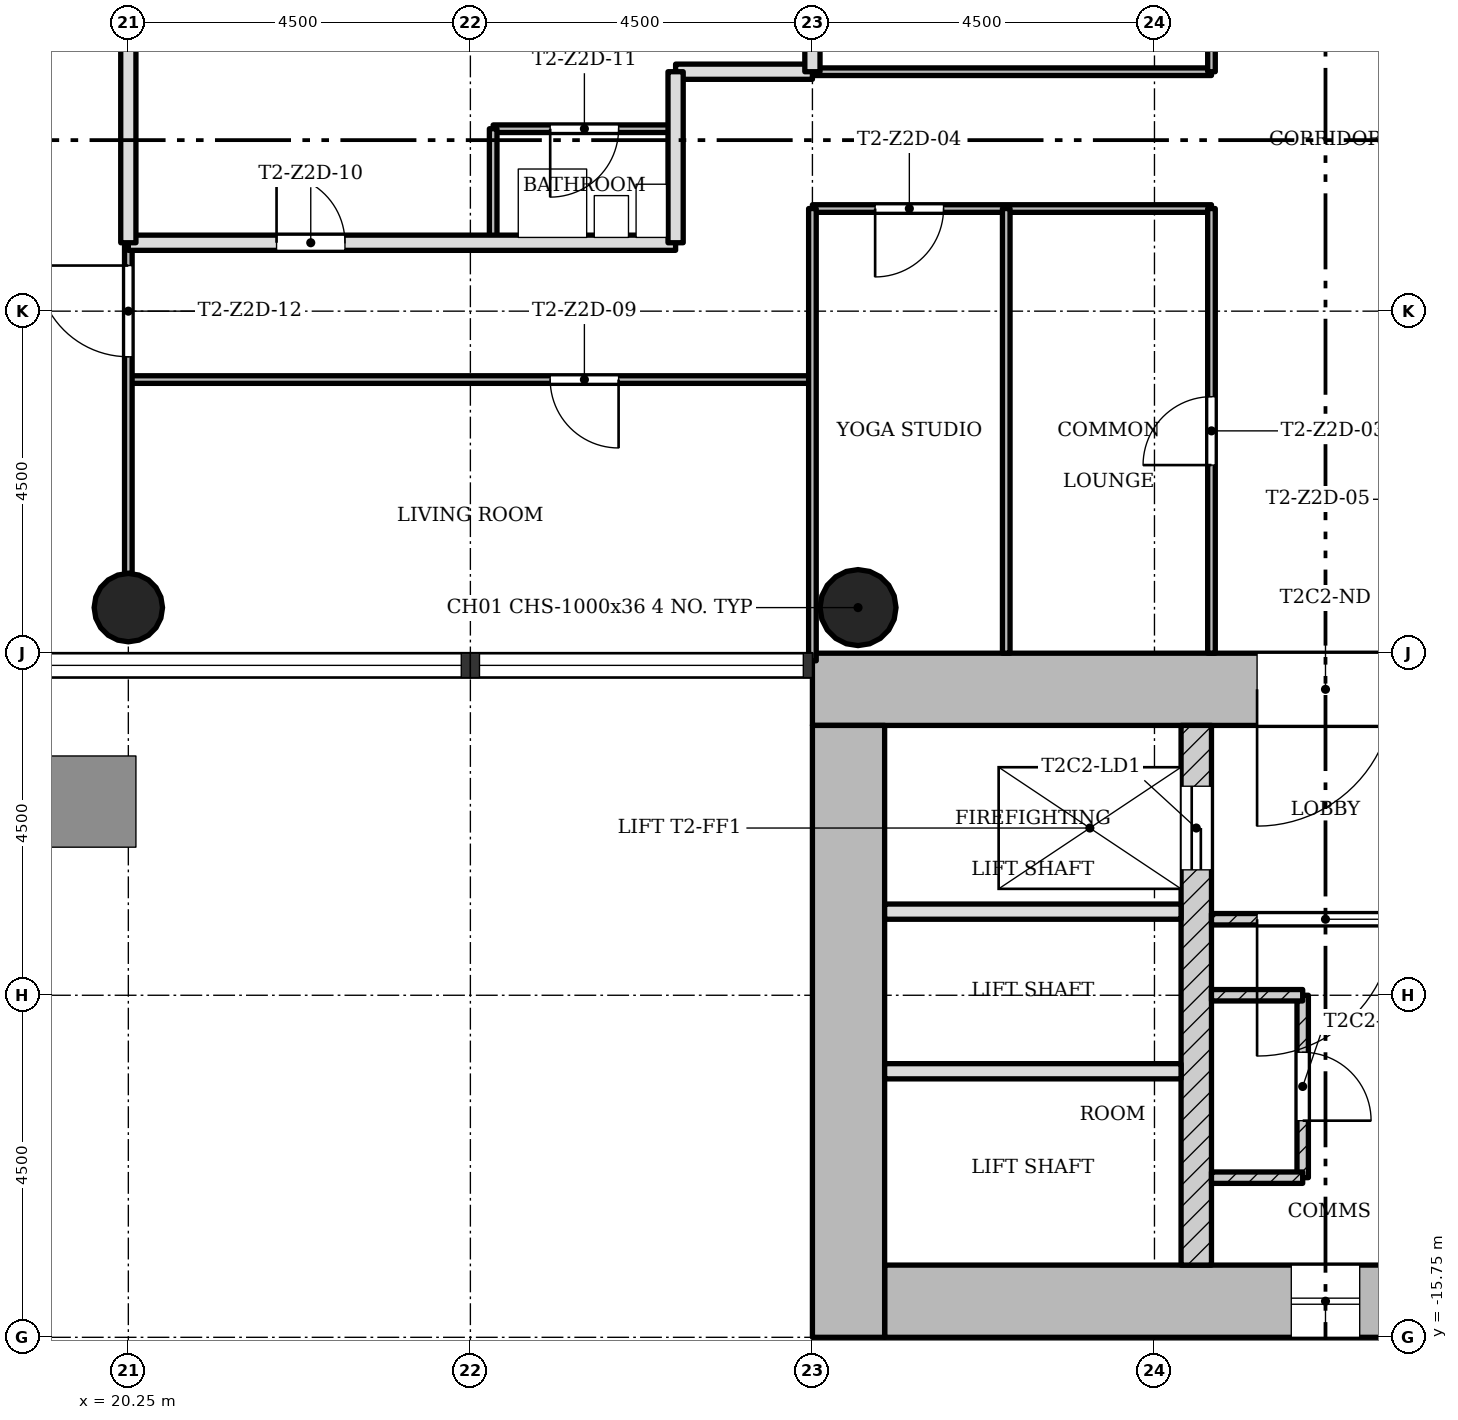
"""IFC4 building model, lengths in metres.
Left out: names, types, materials, properties, quantities, classifications, styles, units other than length and angle.
Written with IfcOpenShell. Run it as: python <this file> out.ifc"""

import sys

from ifc_helpers import new_model, si_unit, direction, frame, frame_2d, origin, origin_2d, place, context, subcontext, project, spatial, rectangle, hollow_circle, extrude, element, fill, save


model = new_model("IFC4")
c1 = context("Model", 3, precision=1e-05, world=origin(), true_north=direction((0.0, 1.0)))
c2 = subcontext(c1, "Body", "Model", "MODEL_VIEW")
j1 = project(units=[si_unit("LENGTHUNIT", "METRE"), si_unit("PLANEANGLEUNIT", "RADIAN")], contexts=[c1])
p1 = place(None, origin())
s1 = spatial("IfcSite", under=j1, at=p1, CompositionType="ELEMENT")
p2 = place(p1, origin())
s2 = spatial("IfcBuilding", under=s1, at=p2, CompositionType="ELEMENT")
p3 = place(p2, frame((0.0, 0.0, 120.8)))
s3 = spatial("IfcBuildingStorey", under=s2, at=p3, CompositionType="ELEMENT", Elevation=120.8)
p4 = place(p3, frame((30.2, -15.275, 0.0), z_axis=(0.0, 0.0, 1.0), x_axis=(1.0, 0.0, 0.0)))
e1 = element("IfcWall", 1, at=p4, inside=s3, PredefinedType="SHEAR", context=c2, shape_type="SweptSolid", body=[
    extrude(rectangle(XDim=12.55, YDim=0.95, at=frame_2d((6.275, 0.0))), origin(), (0.0, 0.0, 1.0), 3.4),
])
p5 = place(p4, frame((5.35, 0.0, 0.45)))
e2 = element("IfcOpeningElement", 2, at=p5, cuts=e1, PredefinedType="OPENING", context=c2, shape_type="SweptSolid", body=[
    extrude(rectangle(XDim=0.9, YDim=2.4, at=frame_2d((0.45, 1.2))), frame((0.0, 0.485, 0.0), z_axis=(0.0, -1.0, 0.0), x_axis=(1.0, 0.0, 0.0)), (0.0, 0.0, 1.0), 0.97),
])
p6 = place(p3, frame((41.8, -7.225, 0.0), z_axis=(0.0, 0.0, 1.0), x_axis=(-1.0, 0.0, 0.0)))
e3 = element("IfcWall", 3, at=p6, inside=s3, PredefinedType="SHEAR", context=c2, shape_type="SweptSolid", body=[
    extrude(rectangle(XDim=12.55, YDim=0.95, at=frame_2d((6.275, 0.0))), origin(), (0.0, 0.0, 1.0), 3.4),
])
p7 = place(p6, frame((4.9, 0.0, 0.0)))
e4 = element("IfcOpeningElement", 4, at=p7, cuts=e3, PredefinedType="OPENING", context=c2, shape_type="SweptSolid", body=[
    extrude(rectangle(XDim=1.8, YDim=2.1, at=frame_2d((0.9, 1.05))), frame((0.0, 0.485, 0.0), z_axis=(0.0, -1.0, 0.0), x_axis=(1.0, 0.0, 0.0)), (0.0, 0.0, 1.0), 0.97),
])
p8 = place(p3, frame((29.725, -7.7, 0.0), z_axis=(0.0, 0.0, 1.0), x_axis=(0.0, -1.0, 0.0)))
e5 = element("IfcWall", 5, at=p8, inside=s3, PredefinedType="SHEAR", context=c2, shape_type="SweptSolid", body=[
    extrude(rectangle(XDim=8.05, YDim=0.95, at=frame_2d((4.025, 0.0))), origin(), (0.0, 0.0, 1.0), 3.4),
])
p9 = place(p3, frame((34.3, -14.8, 0.0), z_axis=(0.0, 0.0, 1.0), x_axis=(0.0, 1.0, 0.0)))
e6 = element("IfcWall", 6, at=p9, inside=s3, PredefinedType="SHEAR", context=c2, shape_type="SweptSolid", body=[
    extrude(rectangle(XDim=7.1, YDim=0.4, at=frame_2d((3.55, 0.0))), origin(), (0.0, 0.0, 1.0), 3.4),
])
p10 = place(p9, frame((5.2, 0.0, 0.0)))
e7 = element("IfcOpeningElement", 7, at=p10, cuts=e6, PredefinedType="OPENING", context=c2, shape_type="SweptSolid", body=[
    extrude(rectangle(XDim=1.1, YDim=2.1, at=frame_2d((0.55, 1.05))), frame((0.0, 0.21, 0.0), z_axis=(0.0, -1.0, 0.0), x_axis=(1.0, 0.0, 0.0)), (0.0, 0.0, 1.0), 0.42),
])
p11 = place(p3, frame((20.25, -6.15, 0.0), z_axis=(0.0, 0.0, 1.0), x_axis=(1.0, 0.0, 0.0)))
e8 = element("IfcColumn", 8, at=p11, inside=s3, PredefinedType="COLUMN", context=c2, shape_type="SweptSolid", body=[
    extrude(hollow_circle(Radius=0.45, WallThickness=0.032, at=origin_2d()), origin(), (0.0, 0.0, 1.0), 3.4),
])
p12 = place(p3, frame((29.85, -6.15, 0.0), z_axis=(0.0, 0.0, 1.0), x_axis=(1.0, 0.0, 0.0)))
e9 = element("IfcColumn", 9, at=p12, inside=s3, PredefinedType="COLUMN", context=c2, shape_type="SweptSolid", body=[
    extrude(hollow_circle(Radius=0.5, WallThickness=0.036, at=origin_2d()), origin(), (0.0, 0.0, 1.0), 3.4),
])
p13 = place(p3, frame((34.5, -10.25, 0.0), z_axis=(0.0, 0.0, 1.0), x_axis=(1.0, 0.0, 0.0)))
e10 = element("IfcWall", 10, at=p13, inside=s3, PredefinedType="PARTITIONING", context=c2, shape_type="SweptSolid", body=[
    extrude(rectangle(XDim=3.0, YDim=0.15, at=frame_2d((1.5, 0.0))), origin(), (0.0, 0.0, 1.0), 3.0),
])
p14 = place(p13, frame((0.6, 0.0, 0.0)))
e11 = element("IfcOpeningElement", 11, at=p14, cuts=e10, PredefinedType="OPENING", context=c2, shape_type="SweptSolid", body=[
    extrude(rectangle(XDim=1.8, YDim=2.1, at=frame_2d((0.9, 1.05))), frame((0.0, 0.085, 0.0), z_axis=(0.0, -1.0, 0.0), x_axis=(1.0, 0.0, 0.0)), (0.0, 0.0, 1.0), 0.17),
])
for number, where, z_axis, x_axis in (
    (12, (30.2, -10.15, 0.0), (0.0, 0.0, 1.0), (1.0, 0.0, 0.0)),
    (13, (30.2, -12.25, 0.0), (0.0, 0.0, 1.0), (1.0, 0.0, 0.0)),
):
    element("IfcWall", number, at=place(p3, frame(where, z_axis=z_axis, x_axis=x_axis)), inside=s3, PredefinedType="SOLIDWALL", context=c2, shape_type="SweptSolid", body=[
        extrude(rectangle(XDim=3.9, YDim=0.2, at=frame_2d((1.95, 0.0))), origin(), (0.0, 0.0, 1.0), 3.0),
    ])
p15 = place(p3, frame((35.7, -11.25, 0.0), z_axis=(0.0, 0.0, 1.0), x_axis=(0.0, -1.0, 0.0)))
e14 = element("IfcWall", 14, at=p15, inside=s3, PredefinedType="PARTITIONING", context=c2, shape_type="SweptSolid", body=[
    extrude(rectangle(XDim=2.4, YDim=0.15, at=frame_2d((1.2, 0.0))), origin(), (0.0, 0.0, 1.0), 3.0),
])
p16 = place(p15, frame((0.75, 0.0, 0.0)))
e15 = element("IfcOpeningElement", 15, at=p16, cuts=e14, PredefinedType="OPENING", context=c2, shape_type="SweptSolid", body=[
    extrude(rectangle(XDim=0.9, YDim=2.1, at=frame_2d((0.45, 1.05))), frame((0.0, 0.085, 0.0), z_axis=(0.0, -1.0, 0.0), x_axis=(1.0, 0.0, 0.0)), (0.0, 0.0, 1.0), 0.17),
])
for number, where, z_axis, x_axis in (
    (16, (35.7, -11.25, 0.0), (0.0, 0.0, 1.0), (-1.0, 0.0, 0.0)),
    (17, (35.7, -13.65, 0.0), (0.0, 0.0, 1.0), (-1.0, 0.0, 0.0)),
):
    element("IfcWall", number, at=place(p3, frame(where, z_axis=z_axis, x_axis=x_axis)), inside=s3, PredefinedType="PARTITIONING", context=c2, shape_type="SweptSolid", body=[
        extrude(rectangle(XDim=1.2, YDim=0.15, at=frame_2d((0.6, 0.0))), origin(), (0.0, 0.0, 1.0), 3.0),
    ])
p17 = place(p3, frame((29.25, -3.15, 0.0), z_axis=(0.0, 0.0, 1.0), x_axis=(-1.0, 0.0, 0.0)))
e18 = element("IfcWall", 18, at=p17, inside=s3, PredefinedType="PARTITIONING", context=c2, shape_type="SweptSolid", body=[
    extrude(rectangle(XDim=9.0, YDim=0.1, at=frame_2d((4.5, 0.0))), origin(), (0.0, 0.0, 1.0), 3.0),
])
p18 = place(p17, frame((2.55, 0.0, 0.0)))
e19 = element("IfcOpeningElement", 19, at=p18, cuts=e18, PredefinedType="OPENING", context=c2, shape_type="SweptSolid", body=[
    extrude(rectangle(XDim=0.9, YDim=2.1, at=frame_2d((0.45, 1.05))), frame((0.0, 0.06, 0.0), z_axis=(0.0, -1.0, 0.0), x_axis=(1.0, 0.0, 0.0)), (0.0, 0.0, 1.0), 0.12),
])
p19 = place(p3, frame((27.45, -1.35, 0.0), z_axis=(0.0, 0.0, 1.0), x_axis=(-1.0, 0.0, 0.0)))
e20 = element("IfcWall", 20, at=p19, inside=s3, PredefinedType="SOLIDWALL", context=c2, shape_type="SweptSolid", body=[
    extrude(rectangle(XDim=7.2, YDim=0.2, at=frame_2d((3.6, 0.0))), origin(), (0.0, 0.0, 1.0), 3.0),
])
p20 = place(p19, frame((4.35, 0.0, 0.0)))
e21 = element("IfcOpeningElement", 21, at=p20, cuts=e20, PredefinedType="OPENING", context=c2, shape_type="SweptSolid", body=[
    extrude(rectangle(XDim=0.9, YDim=2.1, at=frame_2d((0.45, 1.05))), frame((0.0, 0.11, 0.0), z_axis=(0.0, -1.0, 0.0), x_axis=(1.0, 0.0, 0.0)), (0.0, 0.0, 1.0), 0.22),
])
p21 = place(p3, frame((34.5, -0.9, 0.0), z_axis=(0.0, 0.0, 1.0), x_axis=(-1.0, 0.0, 0.0)))
e22 = element("IfcWall", 22, at=p21, inside=s3, PredefinedType="PARTITIONING", context=c2, shape_type="SweptSolid", body=[
    extrude(rectangle(XDim=5.25, YDim=0.1, at=frame_2d((2.625, 0.0))), origin(), (0.0, 0.0, 1.0), 3.0),
])
p22 = place(p21, frame((3.525, 0.0, 0.0)))
e23 = element("IfcOpeningElement", 23, at=p22, cuts=e22, PredefinedType="OPENING", context=c2, shape_type="SweptSolid", body=[
    extrude(rectangle(XDim=0.9, YDim=2.1, at=frame_2d((0.45, 1.05))), frame((0.0, 0.06, 0.0), z_axis=(0.0, -1.0, 0.0), x_axis=(1.0, 0.0, 0.0)), (0.0, 0.0, 1.0), 0.12),
])
p23 = place(p3, frame((27.45, 0.15, 0.0), z_axis=(0.0, 0.0, 1.0), x_axis=(-1.0, 0.0, 0.0)))
e24 = element("IfcWall", 24, at=p23, inside=s3, PredefinedType="PARTITIONING", context=c2, shape_type="SweptSolid", body=[
    extrude(rectangle(XDim=2.4, YDim=0.1, at=frame_2d((1.2, 0.0))), origin(), (0.0, 0.0, 1.0), 3.0),
])
p24 = place(p23, frame((0.75, 0.0, 0.0)))
e25 = element("IfcOpeningElement", 25, at=p24, cuts=e24, PredefinedType="OPENING", context=c2, shape_type="SweptSolid", body=[
    extrude(rectangle(XDim=0.9, YDim=2.1, at=frame_2d((0.45, 1.05))), frame((0.0, 0.06, 0.0), z_axis=(0.0, -1.0, 0.0), x_axis=(1.0, 0.0, 0.0)), (0.0, 0.0, 1.0), 0.12),
])
p25 = place(p3, frame((34.5, 0.9, 0.0), z_axis=(0.0, 0.0, 1.0), x_axis=(-1.0, 0.0, 0.0)))
e26 = element("IfcWall", 26, at=p25, inside=s3, PredefinedType="PARTITIONING", context=c2, shape_type="SweptSolid", body=[
    extrude(rectangle(XDim=5.25, YDim=0.1, at=frame_2d((2.625, 0.0))), origin(), (0.0, 0.0, 1.0), 3.0),
])
p26 = place(p3, frame((29.25, 0.9, 0.0), z_axis=(0.0, 0.0, 1.0), x_axis=(-1.0, 0.0, 0.0)))
e27 = element("IfcWall", 27, at=p26, inside=s3, PredefinedType="SOLIDWALL", context=c2, shape_type="SweptSolid", body=[
    extrude(rectangle(XDim=1.8, YDim=0.2, at=frame_2d((0.9, 0.0))), origin(), (0.0, 0.0, 1.0), 3.0),
])
p27 = place(p3, frame((34.5, -6.75, 0.0), z_axis=(0.0, 0.0, 1.0), x_axis=(0.0, 1.0, 0.0)))
e28 = element("IfcWall", 28, at=p27, inside=s3, PredefinedType="PARTITIONING", context=c2, shape_type="SweptSolid", body=[
    extrude(rectangle(XDim=5.85, YDim=0.1, at=frame_2d((2.925, 0.0))), origin(), (0.0, 0.0, 1.0), 3.0),
])
p28 = place(p27, frame((2.475, 0.0, 0.0)))
e29 = element("IfcOpeningElement", 29, at=p28, cuts=e28, PredefinedType="OPENING", context=c2, shape_type="SweptSolid", body=[
    extrude(rectangle(XDim=0.9, YDim=2.1, at=frame_2d((0.45, 1.05))), frame((0.0, 0.06, 0.0), z_axis=(0.0, -1.0, 0.0), x_axis=(1.0, 0.0, 0.0)), (0.0, 0.0, 1.0), 0.12),
])
p29 = place(p3, frame((34.5, 0.9, 0.0), z_axis=(0.0, 0.0, 1.0), x_axis=(0.0, 1.0, 0.0)))
e30 = element("IfcWall", 30, at=p29, inside=s3, PredefinedType="PARTITIONING", context=c2, shape_type="SweptSolid", body=[
    extrude(rectangle(XDim=5.85, YDim=0.1, at=frame_2d((2.925, 0.0))), origin(), (0.0, 0.0, 1.0), 3.0),
])
p30 = place(p29, frame((2.475, 0.0, 0.0)))
e31 = element("IfcOpeningElement", 31, at=p30, cuts=e30, PredefinedType="OPENING", context=c2, shape_type="SweptSolid", body=[
    extrude(rectangle(XDim=0.9, YDim=2.1, at=frame_2d((0.45, 1.05))), frame((0.0, 0.06, 0.0), z_axis=(0.0, -1.0, 0.0), x_axis=(1.0, 0.0, 0.0)), (0.0, 0.0, 1.0), 0.12),
])
p31 = place(p3, frame((31.8, -6.75, 0.0), z_axis=(0.0, 0.0, 1.0), x_axis=(0.0, 1.0, 0.0)))
e32 = element("IfcWall", 32, at=p31, inside=s3, PredefinedType="PARTITIONING", context=c2, shape_type="SweptSolid", body=[
    extrude(rectangle(XDim=5.85, YDim=0.1, at=frame_2d((2.925, 0.0))), origin(), (0.0, 0.0, 1.0), 3.0),
])
p32 = place(p3, frame((29.25, -6.85, 0.0), z_axis=(0.0, 0.0, 1.0), x_axis=(0.0, 1.0, 0.0)))
e33 = element("IfcWall", 33, at=p32, inside=s3, PredefinedType="PARTITIONING", context=c2, shape_type="SweptSolid", body=[
    extrude(rectangle(XDim=5.95, YDim=0.1, at=frame_2d((2.975, 0.0))), origin(), (0.0, 0.0, 1.0), 3.0),
])
p33 = place(p3, frame((29.25, 0.9, 0.0), z_axis=(0.0, 0.0, 1.0), x_axis=(0.0, 1.0, 0.0)))
e34 = element("IfcWall", 34, at=p33, inside=s3, PredefinedType="SOLIDWALL", context=c2, shape_type="SweptSolid", body=[
    extrude(rectangle(XDim=5.95, YDim=0.2, at=frame_2d((2.975, 0.0))), origin(), (0.0, 0.0, 1.0), 3.0),
])
p34 = place(p3, frame((27.45, -1.35, 0.0), z_axis=(0.0, 0.0, 1.0), x_axis=(0.0, 1.0, 0.0)))
e35 = element("IfcWall", 35, at=p34, inside=s3, PredefinedType="SOLIDWALL", context=c2, shape_type="SweptSolid", body=[
    extrude(rectangle(XDim=2.25, YDim=0.2, at=frame_2d((1.125, 0.0))), origin(), (0.0, 0.0, 1.0), 3.0),
])
p35 = place(p3, frame((25.05, -1.35, 0.0), z_axis=(0.0, 0.0, 1.0), x_axis=(0.0, 1.0, 0.0)))
e36 = element("IfcWall", 36, at=p35, inside=s3, PredefinedType="PARTITIONING", context=c2, shape_type="SweptSolid", body=[
    extrude(rectangle(XDim=1.5, YDim=0.1, at=frame_2d((0.75, 0.0))), origin(), (0.0, 0.0, 1.0), 3.0),
])
p36 = place(p3, frame((20.25, -5.7, 0.0), z_axis=(0.0, 0.0, 1.0), x_axis=(0.0, 1.0, 0.0)))
e37 = element("IfcWall", 37, at=p36, inside=s3, PredefinedType="PARTITIONING", context=c2, shape_type="SweptSolid", body=[
    extrude(rectangle(XDim=4.35, YDim=0.1, at=frame_2d((2.175, 0.0))), origin(), (0.0, 0.0, 1.0), 3.0),
])
p37 = place(p36, frame((2.85, 0.0, 0.0)))
e38 = element("IfcOpeningElement", 38, at=p37, cuts=e37, PredefinedType="OPENING", context=c2, shape_type="SweptSolid", body=[
    extrude(rectangle(XDim=1.2, YDim=2.1, at=frame_2d((0.6, 1.05))), frame((0.0, 0.06, 0.0), z_axis=(0.0, -1.0, 0.0), x_axis=(1.0, 0.0, 0.0)), (0.0, 0.0, 1.0), 0.12),
])
p38 = place(p3, frame((20.25, -1.35, 0.0), z_axis=(0.0, 0.0, 1.0), x_axis=(0.0, 1.0, 0.0)))
e39 = element("IfcWall", 39, at=p38, inside=s3, PredefinedType="SOLIDWALL", context=c2, shape_type="SweptSolid", body=[
    extrude(rectangle(XDim=7.05, YDim=0.2, at=frame_2d((3.525, 0.0))), origin(), (0.0, 0.0, 1.0), 3.0),
])
p39 = place(p5, origin())
e40 = element("IfcWindow", 40, at=p39, inside=s3, PartitioningType="SINGLE_PANEL", PredefinedType="WINDOW", context=c2, shape_type="SweptSolid", body=[
    extrude(rectangle(XDim=0.9, YDim=2.4, at=frame_2d((0.45, 1.2))), frame((0.0, 0.03, 0.0), z_axis=(0.0, -1.0, 0.0), x_axis=(1.0, 0.0, 0.0)), (0.0, 0.0, 1.0), 0.06),
])
fill(e2, e40)
p40 = place(p14, origin())
e41 = element("IfcDoor", 41, at=p40, inside=s3, OperationType="SINGLE_SWING_LEFT", PredefinedType="DOOR", context=c2, shape_type="SweptSolid", body=[
    extrude(rectangle(XDim=1.8, YDim=2.1, at=frame_2d((0.9, 1.05))), frame((0.0, 0.025, 0.0), z_axis=(0.0, -1.0, 0.0), x_axis=(1.0, 0.0, 0.0)), (0.0, 0.0, 1.0), 0.05),
])
fill(e11, e41)
p41 = place(p16, origin())
e42 = element("IfcDoor", 42, at=p41, inside=s3, OperationType="SINGLE_SWING_LEFT", PredefinedType="DOOR", context=c2, shape_type="SweptSolid", body=[
    extrude(rectangle(XDim=0.9, YDim=2.1, at=frame_2d((0.45, 1.05))), frame((0.0, 0.025, 0.0), z_axis=(0.0, -1.0, 0.0), x_axis=(1.0, 0.0, 0.0)), (0.0, 0.0, 1.0), 0.05),
])
fill(e15, e42)
p42 = place(p28, origin())
e43 = element("IfcDoor", 43, at=p42, inside=s3, OperationType="SINGLE_SWING_RIGHT", PredefinedType="DOOR", context=c2, shape_type="SweptSolid", body=[
    extrude(rectangle(XDim=0.9, YDim=2.1, at=frame_2d((0.45, 1.05))), frame((0.0, 0.025, 0.0), z_axis=(0.0, -1.0, 0.0), x_axis=(1.0, 0.0, 0.0)), (0.0, 0.0, 1.0), 0.05),
])
fill(e29, e43)
p43 = place(p22, origin())
e44 = element("IfcDoor", 44, at=p43, inside=s3, OperationType="SINGLE_SWING_LEFT", PredefinedType="DOOR", context=c2, shape_type="SweptSolid", body=[
    extrude(rectangle(XDim=0.9, YDim=2.1, at=frame_2d((0.45, 1.05))), frame((0.0, 0.025, 0.0), z_axis=(0.0, -1.0, 0.0), x_axis=(1.0, 0.0, 0.0)), (0.0, 0.0, 1.0), 0.05),
])
fill(e23, e44)
p44 = place(p18, origin())
e45 = element("IfcDoor", 45, at=p44, inside=s3, OperationType="SINGLE_SWING_RIGHT", PredefinedType="DOOR", context=c2, shape_type="SweptSolid", body=[
    extrude(rectangle(XDim=0.9, YDim=2.1, at=frame_2d((0.45, 1.05))), frame((0.0, 0.025, 0.0), z_axis=(0.0, -1.0, 0.0), x_axis=(1.0, 0.0, 0.0)), (0.0, 0.0, 1.0), 0.05),
])
fill(e19, e45)
p45 = place(p20, origin())
e46 = element("IfcDoor", 46, at=p45, inside=s3, OperationType="SINGLE_SWING_RIGHT", PredefinedType="DOOR", context=c2, shape_type="SweptSolid", body=[
    extrude(rectangle(XDim=0.9, YDim=2.1, at=frame_2d((0.45, 1.05))), frame((0.0, 0.025, 0.0), z_axis=(0.0, -1.0, 0.0), x_axis=(1.0, 0.0, 0.0)), (0.0, 0.0, 1.0), 0.05),
])
fill(e21, e46)
p46 = place(p24, origin())
e47 = element("IfcDoor", 47, at=p46, inside=s3, OperationType="SINGLE_SWING_LEFT", PredefinedType="DOOR", context=c2, shape_type="SweptSolid", body=[
    extrude(rectangle(XDim=0.9, YDim=2.1, at=frame_2d((0.45, 1.05))), frame((0.0, 0.025, 0.0), z_axis=(0.0, -1.0, 0.0), x_axis=(1.0, 0.0, 0.0)), (0.0, 0.0, 1.0), 0.05),
])
fill(e25, e47)
p47 = place(p37, origin())
e48 = element("IfcDoor", 48, at=p47, inside=s3, OperationType="SINGLE_SWING_LEFT", PredefinedType="DOOR", context=c2, shape_type="SweptSolid", body=[
    extrude(rectangle(XDim=1.2, YDim=2.1, at=frame_2d((0.6, 1.05))), frame((0.0, 0.025, 0.0), z_axis=(0.0, -1.0, 0.0), x_axis=(1.0, 0.0, 0.0)), (0.0, 0.0, 1.0), 0.05),
])
fill(e38, e48)
p48 = place(p10, origin())
e49 = element("IfcDoor", 49, at=p48, inside=s3, OperationType="SLIDING_TO_LEFT", PredefinedType="DOOR", context=c2, shape_type="SweptSolid", body=[
    extrude(rectangle(XDim=1.1, YDim=2.1, at=frame_2d((0.55, 1.05))), frame((0.0, 0.025, 0.0), z_axis=(0.0, -1.0, 0.0), x_axis=(1.0, 0.0, 0.0)), (0.0, 0.0, 1.0), 0.05),
])
fill(e7, e49)
p49 = place(p7, origin())
e50 = element("IfcDoor", 50, at=p49, inside=s3, OperationType="SINGLE_SWING_LEFT", PredefinedType="DOOR", context=c2, shape_type="SweptSolid", body=[
    extrude(rectangle(XDim=1.8, YDim=2.1, at=frame_2d((0.9, 1.05))), frame((0.0, 0.025, 0.0), z_axis=(0.0, -1.0, 0.0), x_axis=(1.0, 0.0, 0.0)), (0.0, 0.0, 1.0), 0.05),
])
fill(e4, e50)
save(model, sys.argv[1])
